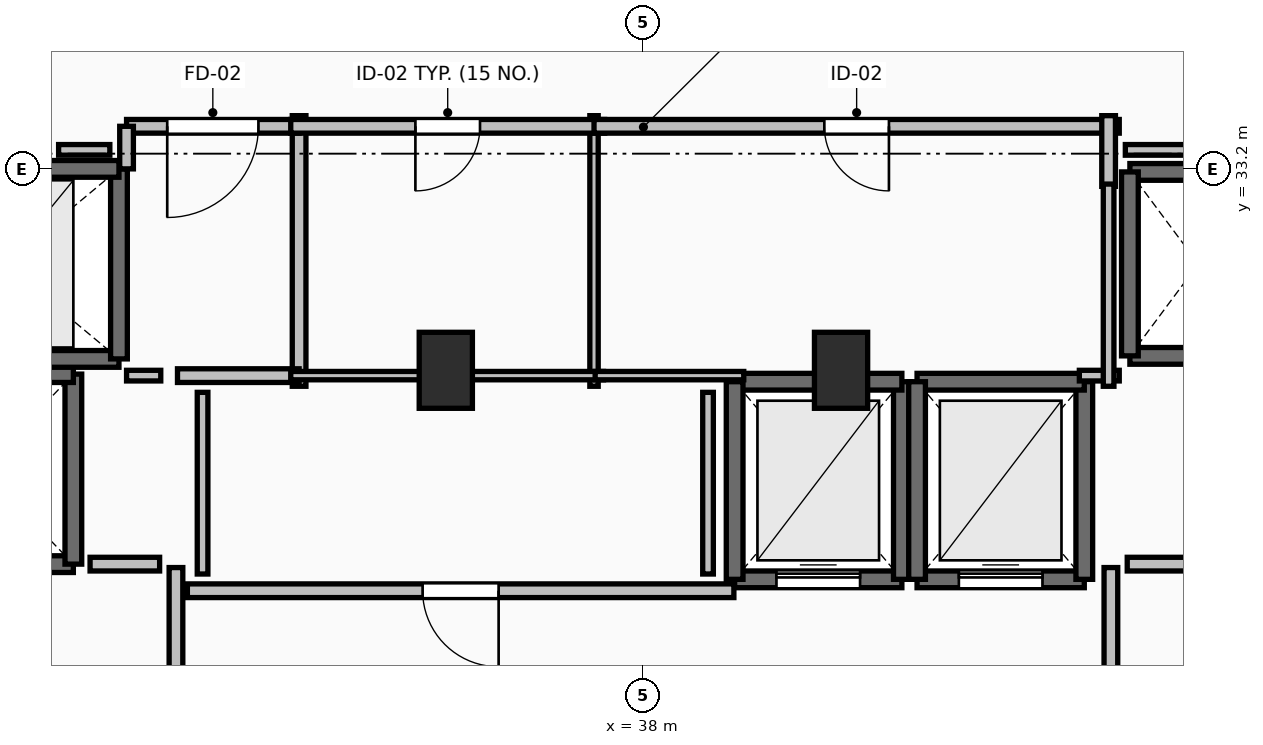
"""IFC4 building model, lengths in metres.
Left out: names, types, materials, properties, quantities, classifications, styles, units other than length and angle.
Written with IfcOpenShell. Run it as: python <this file> out.ifc"""

import sys

from ifc_helpers import new_model, si_unit, direction, frame, frame_2d, origin, origin_2d, place, context, subcontext, project, spatial, rectangle, extrude, element, fill, save


model = new_model("IFC4")
c1 = context("Model", 3, precision=1e-05, world=origin(), true_north=direction((0.0, 1.0)))
c2 = subcontext(c1, "Body", "Model", "MODEL_VIEW")
j1 = project(units=[si_unit("LENGTHUNIT", "METRE"), si_unit("PLANEANGLEUNIT", "RADIAN")], contexts=[c1])
p1 = place(None, origin())
s1 = spatial("IfcSite", under=j1, at=p1, CompositionType="ELEMENT")
p2 = place(p1, origin())
s2 = spatial("IfcBuilding", under=s1, at=p2, CompositionType="ELEMENT")
p3 = place(p2, frame((0.0, 0.0, 241.35)))
s3 = spatial("IfcBuildingStorey", under=s2, at=p3, CompositionType="ELEMENT", Elevation=241.35)
for number, where, z_axis, x_axis in (
    (1, (35.4, 30.55, 0.0), (0.0, 0.0, 1.0), (1.0, 0.0, 0.0)),
    (2, (40.6, 30.55, 0.0), (0.0, 0.0, 1.0), (1.0, 0.0, 0.0)),
):
    element("IfcColumn", number, at=place(p3, frame(where, z_axis=z_axis, x_axis=x_axis)), inside=s3, PredefinedType="PILASTER", context=c2, shape_type="SweptSolid", body=[
        extrude(rectangle(XDim=0.7, YDim=1.0, at=origin_2d()), origin(), (0.0, 0.0, 1.0), 3.55),
    ])
p4 = place(p3, frame((39.2, 27.8, 0.0), z_axis=(0.0, 0.0, 1.0), x_axis=(1.0, 0.0, 0.0)))
e3 = element("IfcWall", 3, at=p4, inside=s3, PredefinedType="SOLIDWALL", context=c2, shape_type="SweptSolid", body=[
    extrude(rectangle(XDim=2.2, YDim=0.22, at=frame_2d((1.1, 0.0))), origin(), (0.0, 0.0, 1.0), 3.29),
])
p5 = place(p4, frame((0.55, 0.0, 0.0)))
e4 = element("IfcOpeningElement", 4, at=p5, cuts=e3, PredefinedType="OPENING", context=c2, shape_type="SweptSolid", body=[
    extrude(rectangle(XDim=1.1, YDim=2.2, at=frame_2d((0.55, 1.1))), frame((0.0, 0.125, 0.0), z_axis=(0.0, -1.0, 0.0), x_axis=(1.0, 0.0, 0.0)), (0.0, 0.0, 1.0), 0.25),
])
p6 = place(p3, frame((41.4, 27.8, 0.0), z_axis=(0.0, 0.0, 1.0), x_axis=(0.0, 1.0, 0.0)))
e5 = element("IfcWall", 5, at=p6, inside=s3, PredefinedType="SOLIDWALL", context=c2, shape_type="SweptSolid", body=[
    extrude(rectangle(XDim=2.6, YDim=0.22, at=frame_2d((1.3, 0.0))), origin(), (0.0, 0.0, 1.0), 3.29),
])
p7 = place(p3, frame((41.4, 30.4, 0.0), z_axis=(0.0, 0.0, 1.0), x_axis=(-1.0, 0.0, 0.0)))
e6 = element("IfcWall", 6, at=p7, inside=s3, PredefinedType="SOLIDWALL", context=c2, shape_type="SweptSolid", body=[
    extrude(rectangle(XDim=2.2, YDim=0.22, at=frame_2d((1.1, 0.0))), origin(), (0.0, 0.0, 1.0), 3.29),
])
p8 = place(p3, frame((39.2, 30.4, 0.0), z_axis=(0.0, 0.0, 1.0), x_axis=(0.0, -1.0, 0.0)))
e7 = element("IfcWall", 7, at=p8, inside=s3, PredefinedType="SOLIDWALL", context=c2, shape_type="SweptSolid", body=[
    extrude(rectangle(XDim=2.6, YDim=0.22, at=frame_2d((1.3, 0.0))), origin(), (0.0, 0.0, 1.0), 3.29),
])
p9 = place(p3, frame((41.6, 27.8, 0.0), z_axis=(0.0, 0.0, 1.0), x_axis=(1.0, 0.0, 0.0)))
e8 = element("IfcWall", 8, at=p9, inside=s3, PredefinedType="SOLIDWALL", context=c2, shape_type="SweptSolid", body=[
    extrude(rectangle(XDim=2.2, YDim=0.22, at=frame_2d((1.1, 0.0))), origin(), (0.0, 0.0, 1.0), 3.29),
])
p10 = place(p9, frame((0.55, 0.0, 0.0)))
e9 = element("IfcOpeningElement", 9, at=p10, cuts=e8, PredefinedType="OPENING", context=c2, shape_type="SweptSolid", body=[
    extrude(rectangle(XDim=1.1, YDim=2.2, at=frame_2d((0.55, 1.1))), frame((0.0, 0.125, 0.0), z_axis=(0.0, -1.0, 0.0), x_axis=(1.0, 0.0, 0.0)), (0.0, 0.0, 1.0), 0.25),
])
p11 = place(p3, frame((43.8, 27.8, 0.0), z_axis=(0.0, 0.0, 1.0), x_axis=(0.0, 1.0, 0.0)))
e10 = element("IfcWall", 10, at=p11, inside=s3, PredefinedType="SOLIDWALL", context=c2, shape_type="SweptSolid", body=[
    extrude(rectangle(XDim=2.6, YDim=0.22, at=frame_2d((1.3, 0.0))), origin(), (0.0, 0.0, 1.0), 3.29),
])
p12 = place(p3, frame((43.8, 30.4, 0.0), z_axis=(0.0, 0.0, 1.0), x_axis=(-1.0, 0.0, 0.0)))
e11 = element("IfcWall", 11, at=p12, inside=s3, PredefinedType="SOLIDWALL", context=c2, shape_type="SweptSolid", body=[
    extrude(rectangle(XDim=2.2, YDim=0.22, at=frame_2d((1.1, 0.0))), origin(), (0.0, 0.0, 1.0), 3.29),
])
p13 = place(p3, frame((41.6, 30.4, 0.0), z_axis=(0.0, 0.0, 1.0), x_axis=(0.0, -1.0, 0.0)))
e12 = element("IfcWall", 12, at=p13, inside=s3, PredefinedType="SOLIDWALL", context=c2, shape_type="SweptSolid", body=[
    extrude(rectangle(XDim=2.6, YDim=0.22, at=frame_2d((1.3, 0.0))), origin(), (0.0, 0.0, 1.0), 3.29),
])
for number, where, z_axis, x_axis in (
    (13, (44.4, 30.74, 0.0), (0.0, 0.0, 1.0), (1.0, 0.0, 0.0)),
    (14, (46.2, 33.16, 0.0), (0.0, 0.0, 1.0), (-1.0, 0.0, 0.0)),
):
    element("IfcWall", number, at=place(p3, frame(where, z_axis=z_axis, x_axis=x_axis)), inside=s3, PredefinedType="SOLIDWALL", context=c2, shape_type="SweptSolid", body=[
        extrude(rectangle(XDim=1.8, YDim=0.22, at=frame_2d((0.9, 0.0))), origin(), (0.0, 0.0, 1.0), 3.29),
    ])
p14 = place(p3, frame((44.4, 33.16, 0.0), z_axis=(0.0, 0.0, 1.0), x_axis=(0.0, -1.0, 0.0)))
e15 = element("IfcWall", 15, at=p14, inside=s3, PredefinedType="SOLIDWALL", context=c2, shape_type="SweptSolid", body=[
    extrude(rectangle(XDim=2.42, YDim=0.22, at=frame_2d((1.21, 0.0))), origin(), (0.0, 0.0, 1.0), 3.29),
])
p15 = place(p3, frame((28.1, 28.0, 0.0), z_axis=(0.0, 0.0, 1.0), x_axis=(1.0, 0.0, 0.0)))
e16 = element("IfcWall", 16, at=p15, inside=s3, PredefinedType="SHEAR", context=c2, shape_type="SweptSolid", body=[
    extrude(rectangle(XDim=2.4, YDim=0.22, at=frame_2d((1.2, 0.0))), origin(), (0.0, 0.0, 1.0), 3.29),
])
p16 = place(p15, frame((0.6, 0.0, 0.0)))
e17 = element("IfcOpeningElement", 17, at=p16, cuts=e16, PredefinedType="OPENING", context=c2, shape_type="SweptSolid", body=[
    extrude(rectangle(XDim=1.2, YDim=2.2, at=frame_2d((0.6, 1.1))), frame((0.0, 0.125, 0.0), z_axis=(0.0, -1.0, 0.0), x_axis=(1.0, 0.0, 0.0)), (0.0, 0.0, 1.0), 0.25),
])
p17 = place(p3, frame((30.5, 28.0, 0.0), z_axis=(0.0, 0.0, 1.0), x_axis=(0.0, 1.0, 0.0)))
e18 = element("IfcWall", 18, at=p17, inside=s3, PredefinedType="SHEAR", context=c2, shape_type="SweptSolid", body=[
    extrude(rectangle(XDim=2.5, YDim=0.22, at=frame_2d((1.25, 0.0))), origin(), (0.0, 0.0, 1.0), 3.29),
])
p18 = place(p3, frame((30.5, 30.5, 0.0), z_axis=(0.0, 0.0, 1.0), x_axis=(-1.0, 0.0, 0.0)))
e19 = element("IfcWall", 19, at=p18, inside=s3, PredefinedType="SHEAR", context=c2, shape_type="SweptSolid", body=[
    extrude(rectangle(XDim=2.4, YDim=0.22, at=frame_2d((1.2, 0.0))), origin(), (0.0, 0.0, 1.0), 3.29),
])
p19 = place(p3, frame((28.1, 30.7, 0.0), z_axis=(0.0, 0.0, 1.0), x_axis=(1.0, 0.0, 0.0)))
e20 = element("IfcWall", 20, at=p19, inside=s3, PredefinedType="SOLIDWALL", context=c2, shape_type="SweptSolid", body=[
    extrude(rectangle(XDim=3.0, YDim=0.22, at=frame_2d((1.5, 0.0))), origin(), (0.0, 0.0, 1.0), 3.29),
])
p20 = place(p3, frame((31.1, 30.7, 0.0), z_axis=(0.0, 0.0, 1.0), x_axis=(0.0, 1.0, 0.0)))
e21 = element("IfcWall", 21, at=p20, inside=s3, PredefinedType="SOLIDWALL", context=c2, shape_type="SweptSolid", body=[
    extrude(rectangle(XDim=2.5, YDim=0.22, at=frame_2d((1.25, 0.0))), origin(), (0.0, 0.0, 1.0), 3.29),
])
p21 = place(p3, frame((31.1, 33.2, 0.0), z_axis=(0.0, 0.0, 1.0), x_axis=(-1.0, 0.0, 0.0)))
e22 = element("IfcWall", 22, at=p21, inside=s3, PredefinedType="SOLIDWALL", context=c2, shape_type="SweptSolid", body=[
    extrude(rectangle(XDim=3.0, YDim=0.22, at=frame_2d((1.5, 0.0))), origin(), (0.0, 0.0, 1.0), 3.29),
])
p22 = place(p21, frame((0.9, 0.0, 0.0)))
e23 = element("IfcOpeningElement", 23, at=p22, cuts=e22, PredefinedType="OPENING", context=c2, shape_type="SweptSolid", body=[
    extrude(rectangle(XDim=1.2, YDim=2.2, at=frame_2d((0.6, 1.1))), frame((0.0, 0.125, 0.0), z_axis=(0.0, -1.0, 0.0), x_axis=(1.0, 0.0, 0.0)), (0.0, 0.0, 1.0), 0.25),
])
p23 = place(p3, frame((31.85, 24.045, 0.0), z_axis=(0.0, 0.0, 1.0), x_axis=(0.0, 1.0, 0.0)))
e24 = element("IfcWall", 24, at=p23, inside=s3, PredefinedType="PARTITIONING", context=c2, shape_type="SweptSolid", body=[
    extrude(rectangle(XDim=3.91, YDim=0.18, at=frame_2d((1.955, 0.0))), origin(), (0.0, 0.0, 1.0), 3.29),
])
p24 = place(p23, frame((1.355, 0.0, 0.0)))
e25 = element("IfcOpeningElement", 25, at=p24, cuts=e24, PredefinedType="OPENING", context=c2, shape_type="SweptSolid", body=[
    extrude(rectangle(XDim=1.2, YDim=2.15, at=frame_2d((0.6, 1.075))), frame((0.0, 0.105, 0.0), z_axis=(0.0, -1.0, 0.0), x_axis=(1.0, 0.0, 0.0)), (0.0, 0.0, 1.0), 0.21),
])
p25 = place(p3, frame((44.15, 27.955, 0.0), z_axis=(0.0, 0.0, 1.0), x_axis=(0.0, -1.0, 0.0)))
e26 = element("IfcWall", 26, at=p25, inside=s3, PredefinedType="PARTITIONING", context=c2, shape_type="SweptSolid", body=[
    extrude(rectangle(XDim=3.91, YDim=0.18, at=frame_2d((1.955, 0.0))), origin(), (0.0, 0.0, 1.0), 3.29),
])
p26 = place(p25, frame((1.355, 0.0, 0.0)))
e27 = element("IfcOpeningElement", 27, at=p26, cuts=e26, PredefinedType="OPENING", context=c2, shape_type="SweptSolid", body=[
    extrude(rectangle(XDim=1.2, YDim=2.15, at=frame_2d((0.6, 1.075))), frame((0.0, 0.105, 0.0), z_axis=(0.0, -1.0, 0.0), x_axis=(1.0, 0.0, 0.0)), (0.0, 0.0, 1.0), 0.21),
])
p27 = place(p3, frame((33.47, 30.34, 0.0), z_axis=(0.0, 0.0, 1.0), x_axis=(0.0, 1.0, 0.0)))
e28 = element("IfcWall", 28, at=p27, inside=s3, PredefinedType="PARTITIONING", context=c2, shape_type="SweptSolid", body=[
    extrude(rectangle(XDim=3.56, YDim=0.18, at=frame_2d((1.78, 0.0))), origin(), (0.0, 0.0, 1.0), 3.29),
])
p28 = place(p3, frame((31.87, 30.48, 0.0), z_axis=(0.0, 0.0, 1.0), x_axis=(1.0, 0.0, 0.0)))
e29 = element("IfcWall", 29, at=p28, inside=s3, PredefinedType="PARTITIONING", context=c2, shape_type="SweptSolid", body=[
    extrude(rectangle(XDim=1.6, YDim=0.18, at=frame_2d((0.8, 0.0))), origin(), (0.0, 0.0, 1.0), 3.29),
])
p29 = place(p3, frame((33.47, 33.76, 0.0), z_axis=(0.0, 0.0, 1.0), x_axis=(-1.0, 0.0, 0.0)))
e30 = element("IfcWall", 30, at=p29, inside=s3, PredefinedType="PARTITIONING", context=c2, shape_type="SweptSolid", body=[
    extrude(rectangle(XDim=2.27, YDim=0.18, at=frame_2d((1.135, 0.0))), origin(), (0.0, 0.0, 1.0), 3.29),
])
p30 = place(p29, frame((0.535, 0.0, 0.0)))
e31 = element("IfcOpeningElement", 31, at=p30, cuts=e30, PredefinedType="OPENING", context=c2, shape_type="SweptSolid", body=[
    extrude(rectangle(XDim=1.2, YDim=2.15, at=frame_2d((0.6, 1.075))), frame((0.0, 0.105, 0.0), z_axis=(0.0, -1.0, 0.0), x_axis=(1.0, 0.0, 0.0)), (0.0, 0.0, 1.0), 0.21),
])
p31 = place(p3, frame((31.2, 33.76, 0.0), z_axis=(0.0, 0.0, 1.0), x_axis=(0.0, -1.0, 0.0)))
e32 = element("IfcWall", 32, at=p31, inside=s3, PredefinedType="PARTITIONING", context=c2, shape_type="SweptSolid", body=[
    extrude(rectangle(XDim=0.56, YDim=0.18, at=frame_2d((0.28, 0.0))), origin(), (0.0, 0.0, 1.0), 3.29),
])
p32 = place(p3, frame((39.19, 27.65, 0.0), z_axis=(0.0, 0.0, 1.0), x_axis=(-1.0, 0.0, 0.0)))
e33 = element("IfcWall", 33, at=p32, inside=s3, PredefinedType="PARTITIONING", context=c2, shape_type="SweptSolid", body=[
    extrude(rectangle(XDim=7.19, YDim=0.18, at=frame_2d((3.595, 0.0))), origin(), (0.0, 0.0, 1.0), 3.29),
])
p33 = place(p32, frame((3.095, 0.0, 0.0)))
e34 = element("IfcOpeningElement", 34, at=p33, cuts=e33, PredefinedType="OPENING", context=c2, shape_type="SweptSolid", body=[
    extrude(rectangle(XDim=1.0, YDim=2.15, at=frame_2d((0.5, 1.075))), frame((0.0, 0.105, 0.0), z_axis=(0.0, -1.0, 0.0), x_axis=(1.0, 0.0, 0.0)), (0.0, 0.0, 1.0), 0.21),
])
p34 = place(p3, frame((37.35, 30.34, 0.0), z_axis=(0.0, 0.0, 1.0), x_axis=(0.0, 1.0, 0.0)))
e35 = element("IfcWall", 35, at=p34, inside=s3, PredefinedType="PARTITIONING", context=c2, shape_type="SweptSolid", body=[
    extrude(rectangle(XDim=3.56, YDim=0.11, at=frame_2d((1.78, 0.0))), origin(), (0.0, 0.0, 1.0), 2.482),
])
p35 = place(p3, frame((33.36, 30.48, 0.0), z_axis=(0.0, 0.0, 1.0), x_axis=(1.0, 0.0, 0.0)))
e36 = element("IfcWall", 36, at=p35, inside=s3, PredefinedType="PARTITIONING", context=c2, shape_type="SweptSolid", body=[
    extrude(rectangle(XDim=4.115, YDim=0.11, at=frame_2d((2.058, 0.0))), origin(), (0.0, 0.0, 1.0), 2.482),
])
p36 = place(p3, frame((37.49, 33.76, 0.0), z_axis=(0.0, 0.0, 1.0), x_axis=(-1.0, 0.0, 0.0)))
e37 = element("IfcWall", 37, at=p36, inside=s3, PredefinedType="PARTITIONING", context=c2, shape_type="SweptSolid", body=[
    extrude(rectangle(XDim=4.13, YDim=0.18, at=frame_2d((2.065, 0.0))), origin(), (0.0, 0.0, 1.0), 3.29),
])
p37 = place(p36, frame((1.64, 0.0, 0.0)))
e38 = element("IfcOpeningElement", 38, at=p37, cuts=e37, PredefinedType="OPENING", context=c2, shape_type="SweptSolid", body=[
    extrude(rectangle(XDim=0.85, YDim=2.1, at=frame_2d((0.425, 1.05))), frame((0.0, 0.105, 0.0), z_axis=(0.0, -1.0, 0.0), x_axis=(1.0, 0.0, 0.0)), (0.0, 0.0, 1.0), 0.21),
])
p38 = place(p3, frame((37.365, 30.48, 0.0), z_axis=(0.0, 0.0, 1.0), x_axis=(1.0, 0.0, 0.0)))
e39 = element("IfcWall", 39, at=p38, inside=s3, PredefinedType="PARTITIONING", context=c2, shape_type="SweptSolid", body=[
    extrude(rectangle(XDim=1.955, YDim=0.11, at=frame_2d((0.978, 0.0))), origin(), (0.0, 0.0, 1.0), 2.482),
])
p39 = place(p3, frame((44.26, 33.76, 0.0), z_axis=(0.0, 0.0, 1.0), x_axis=(-1.0, 0.0, 0.0)))
e40 = element("IfcWall", 40, at=p39, inside=s3, PredefinedType="PARTITIONING", context=c2, shape_type="SweptSolid", body=[
    extrude(rectangle(XDim=6.91, YDim=0.18, at=frame_2d((3.455, 0.0))), origin(), (0.0, 0.0, 1.0), 3.29),
])
p40 = place(p39, frame((3.03, 0.0, 0.0)))
e41 = element("IfcOpeningElement", 41, at=p40, cuts=e40, PredefinedType="OPENING", context=c2, shape_type="SweptSolid", body=[
    extrude(rectangle(XDim=0.85, YDim=2.1, at=frame_2d((0.425, 1.05))), frame((0.0, 0.105, 0.0), z_axis=(0.0, -1.0, 0.0), x_axis=(1.0, 0.0, 0.0)), (0.0, 0.0, 1.0), 0.21),
])
p41 = place(p3, frame((44.12, 32.97, 0.0), z_axis=(0.0, 0.0, 1.0), x_axis=(0.0, 1.0, 0.0)))
e42 = element("IfcWall", 42, at=p41, inside=s3, PredefinedType="PARTITIONING", context=c2, shape_type="SweptSolid", body=[
    extrude(rectangle(XDim=0.93, YDim=0.18, at=frame_2d((0.465, 0.0))), origin(), (0.0, 0.0, 1.0), 3.29),
])
for number, where, z_axis, x_axis in (
    (43, (31.635, 28.0, 0.0), (0.0, 0.0, 1.0), (-1.0, 0.0, 0.0)),
    (44, (45.28, 28.0, 0.0), (0.0, 0.0, 1.0), (-1.0, 0.0, 0.0)),
):
    element("IfcWall", number, at=place(p3, frame(where, z_axis=z_axis, x_axis=x_axis)), inside=s3, PredefinedType="PARTITIONING", context=c2, shape_type="SweptSolid", body=[
        extrude(rectangle(XDim=0.915, YDim=0.18, at=frame_2d((0.458, 0.0))), origin(), (0.0, 0.0, 1.0), 3.29),
    ])
p42 = place(p3, frame((31.2, 30.48, 0.0), z_axis=(0.0, 0.0, 1.0), x_axis=(1.0, 0.0, 0.0)))
e45 = element("IfcWall", 45, at=p42, inside=s3, PredefinedType="PARTITIONING", context=c2, shape_type="SweptSolid", body=[
    extrude(rectangle(XDim=0.45, YDim=0.14, at=frame_2d((0.225, 0.0))), origin(), (0.0, 0.0, 1.0), 3.29),
])
p43 = place(p3, frame((43.735, 30.48, 0.0), z_axis=(0.0, 0.0, 1.0), x_axis=(1.0, 0.0, 0.0)))
e46 = element("IfcWall", 46, at=p43, inside=s3, PredefinedType="PARTITIONING", context=c2, shape_type="SweptSolid", body=[
    extrude(rectangle(XDim=0.525, YDim=0.14, at=frame_2d((0.262, 0.0))), origin(), (0.0, 0.0, 1.0), 3.29),
])
p44 = place(p3, frame((44.12, 30.34, 0.0), z_axis=(0.0, 0.0, 1.0), x_axis=(0.0, 1.0, 0.0)))
e47 = element("IfcWall", 47, at=p44, inside=s3, PredefinedType="PARTITIONING", context=c2, shape_type="SweptSolid", body=[
    extrude(rectangle(XDim=2.66, YDim=0.14, at=frame_2d((1.33, 0.0))), origin(), (0.0, 0.0, 1.0), 3.29),
])
for number, where, z_axis, x_axis in (
    (48, (32.2, 30.26, 0.0), (0.0, 0.0, 1.0), (0.0, -1.0, 0.0)),
    (49, (38.85, 27.87, 0.0), (0.0, 0.0, 1.0), (0.0, 1.0, 0.0)),
):
    element("IfcWall", number, at=place(p3, frame(where, z_axis=z_axis, x_axis=x_axis)), inside=s3, PredefinedType="PARTITIONING", context=c2, shape_type="SweptSolid", body=[
        extrude(rectangle(XDim=2.39, YDim=0.14, at=frame_2d((1.195, 0.0))), origin(), (0.0, 0.0, 1.0), 3.29),
    ])
p45 = place(p3, frame((48.55, 33.45, 0.0), z_axis=(0.0, 0.0, 1.0), x_axis=(-1.0, 0.0, 0.0)))
e50 = element("IfcWall", 50, at=p45, inside=s3, PredefinedType="PARTITIONING", context=c2, shape_type="SweptSolid", body=[
    extrude(rectangle(XDim=4.21, YDim=0.14, at=frame_2d((2.105, 0.0))), origin(), (0.0, 0.0, 1.0), 2.482),
])
p46 = place(p3, frame((30.98, 33.45, 0.0), z_axis=(0.0, 0.0, 1.0), x_axis=(-1.0, 0.0, 0.0)))
e51 = element("IfcWall", 51, at=p46, inside=s3, PredefinedType="PARTITIONING", context=c2, shape_type="SweptSolid", body=[
    extrude(rectangle(XDim=0.674, YDim=0.14, at=frame_2d((0.337, 0.0))), origin(), (0.0, 0.0, 1.0), 3.29),
])
p47 = place(p5, origin())
e52 = element("IfcDoor", 52, at=p47, inside=s3, OperationType="SLIDING_TO_LEFT", PredefinedType="DOOR", context=c2, shape_type="SweptSolid", body=[
    extrude(rectangle(XDim=1.1, YDim=2.2, at=frame_2d((0.55, 1.1))), frame((0.0, 0.025, 0.0), z_axis=(0.0, -1.0, 0.0), x_axis=(1.0, 0.0, 0.0)), (0.0, 0.0, 1.0), 0.05),
])
fill(e4, e52)
p48 = place(p10, origin())
e53 = element("IfcDoor", 53, at=p48, inside=s3, OperationType="SLIDING_TO_LEFT", PredefinedType="DOOR", context=c2, shape_type="SweptSolid", body=[
    extrude(rectangle(XDim=1.1, YDim=2.2, at=frame_2d((0.55, 1.1))), frame((0.0, 0.025, 0.0), z_axis=(0.0, -1.0, 0.0), x_axis=(1.0, 0.0, 0.0)), (0.0, 0.0, 1.0), 0.05),
])
fill(e9, e53)
p49 = place(p30, origin())
e54 = element("IfcDoor", 54, at=p49, inside=s3, OperationType="SINGLE_SWING_RIGHT", PredefinedType="DOOR", context=c2, shape_type="SweptSolid", body=[
    extrude(rectangle(XDim=1.2, YDim=2.15, at=frame_2d((0.6, 1.075))), frame((0.0, 0.025, 0.0), z_axis=(0.0, -1.0, 0.0), x_axis=(1.0, 0.0, 0.0)), (0.0, 0.0, 1.0), 0.05),
])
fill(e31, e54)
p50 = place(p33, origin())
e55 = element("IfcDoor", 55, at=p50, inside=s3, OperationType="SINGLE_SWING_LEFT", PredefinedType="DOOR", context=c2, shape_type="SweptSolid", body=[
    extrude(rectangle(XDim=1.0, YDim=2.15, at=frame_2d((0.5, 1.075))), frame((0.0, 0.025, 0.0), z_axis=(0.0, -1.0, 0.0), x_axis=(1.0, 0.0, 0.0)), (0.0, 0.0, 1.0), 0.05),
])
fill(e34, e55)
p51 = place(p37, origin())
e56 = element("IfcDoor", 56, at=p51, inside=s3, OperationType="SINGLE_SWING_RIGHT", PredefinedType="DOOR", context=c2, shape_type="SweptSolid", body=[
    extrude(rectangle(XDim=0.85, YDim=2.1, at=frame_2d((0.425, 1.05))), frame((0.0, 0.025, 0.0), z_axis=(0.0, -1.0, 0.0), x_axis=(1.0, 0.0, 0.0)), (0.0, 0.0, 1.0), 0.05),
])
fill(e38, e56)
p52 = place(p40, origin())
e57 = element("IfcDoor", 57, at=p52, inside=s3, OperationType="SINGLE_SWING_LEFT", PredefinedType="DOOR", context=c2, shape_type="SweptSolid", body=[
    extrude(rectangle(XDim=0.85, YDim=2.1, at=frame_2d((0.425, 1.05))), frame((0.0, 0.025, 0.0), z_axis=(0.0, -1.0, 0.0), x_axis=(1.0, 0.0, 0.0)), (0.0, 0.0, 1.0), 0.05),
])
fill(e41, e57)
save(model, sys.argv[1])
